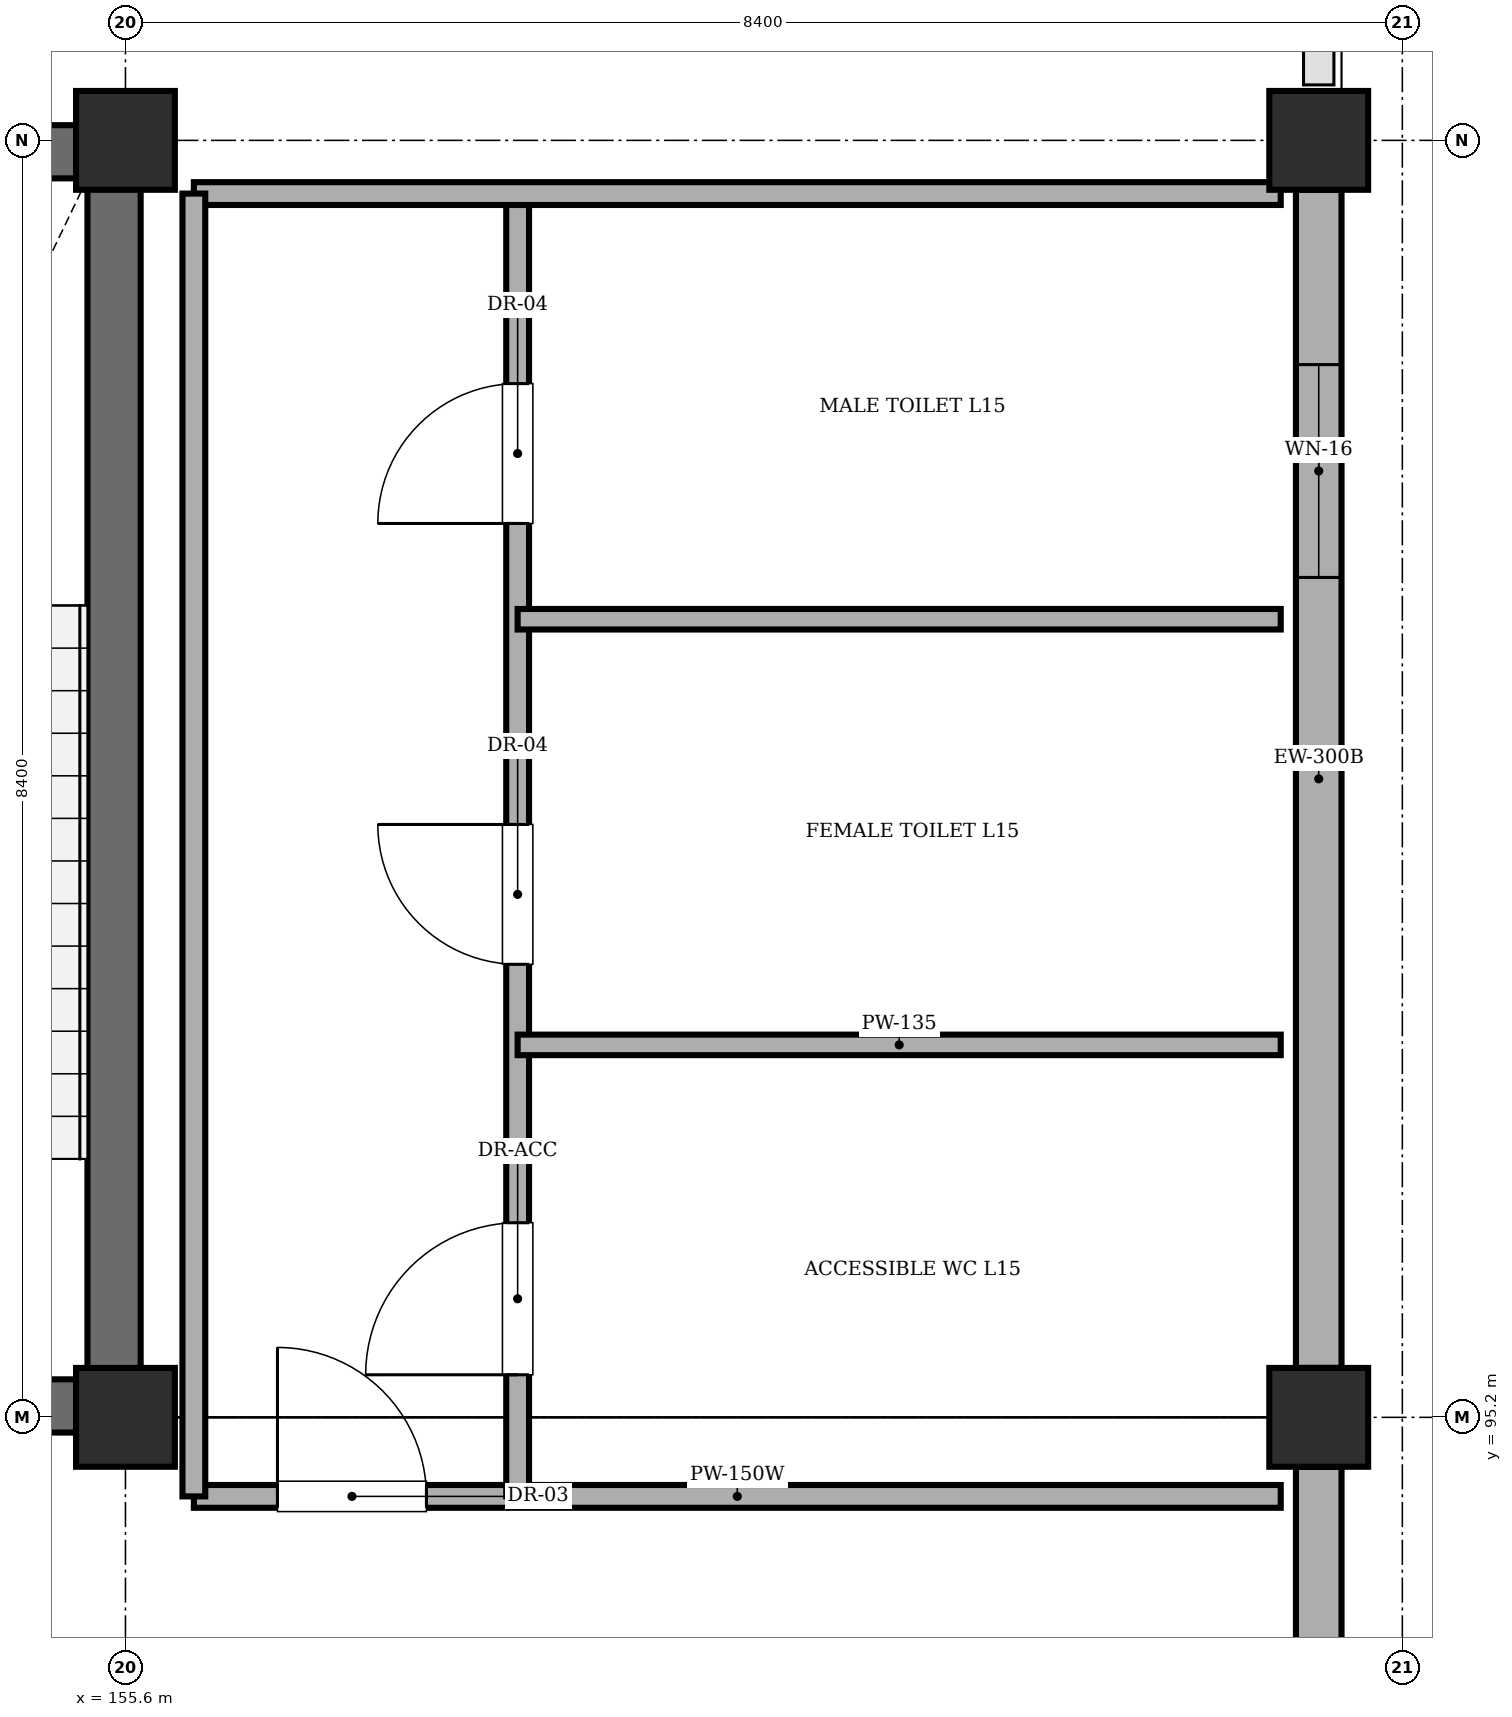
"""IFC4 building model, lengths in metres.
Left out: names, types, materials, properties, quantities, classifications, styles, units other than length and angle.
Written with IfcOpenShell. Run it as: python <this file> out.ifc"""

import sys

from ifc_helpers import new_model, si_unit, direction, frame, frame_2d, origin, origin_2d, place, context, subcontext, project, spatial, rectangle, extrude, element, fill, save


model = new_model("IFC4")
c1 = context("Model", 3, precision=1e-05, world=origin(), true_north=direction((0.0, 1.0)))
c2 = subcontext(c1, "Body", "Model", "MODEL_VIEW")
j1 = project(units=[si_unit("LENGTHUNIT", "METRE"), si_unit("PLANEANGLEUNIT", "RADIAN")], contexts=[c1])
p1 = place(None, origin())
s1 = spatial("IfcSite", under=j1, at=p1, CompositionType="ELEMENT")
p2 = place(p1, origin())
s2 = spatial("IfcBuilding", under=s1, at=p2, CompositionType="ELEMENT")
p3 = place(p2, frame((0.0, 0.0, 61.2)))
s3 = spatial("IfcBuildingStorey", under=s2, at=p3, CompositionType="ELEMENT", Elevation=61.2)
for number, where, z_axis, x_axis in (
    (1, (155.6, 95.2, 0.0), (0.0, 0.0, 1.0), (1.0, 0.0, 0.0)),
    (2, (155.6, 103.6, 0.0), (0.0, 0.0, 1.0), (1.0, 0.0, 0.0)),
    (3, (163.45, 95.2, 0.0), (0.0, 0.0, 1.0), (1.0, 0.0, 0.0)),
    (4, (163.45, 103.6, 0.0), (0.0, 0.0, 1.0), (1.0, 0.0, 0.0)),
):
    element("IfcColumn", number, at=place(p3, frame(where, z_axis=z_axis, x_axis=x_axis)), inside=s3, PredefinedType="COLUMN", context=c2, shape_type="SweptSolid", body=[
        extrude(rectangle(XDim=0.65, YDim=0.65, at=origin_2d()), origin(), (0.0, 0.0, 1.0), 4.28),
    ])
for number, where, z_axis, x_axis in (
    (5, (151.9, 95.275, 0.0), (0.0, 0.0, 1.0), (1.0, 0.0, 0.0)),
    (6, (151.9, 103.525, 0.0), (0.0, 0.0, 1.0), (1.0, 0.0, 0.0)),
):
    element("IfcWall", number, at=place(p3, frame(where, z_axis=z_axis, x_axis=x_axis)), inside=s3, PredefinedType="SHEAR", context=c2, shape_type="SweptSolid", body=[
        extrude(rectangle(XDim=3.8, YDim=0.35, at=frame_2d((1.9, 0.0))), origin(), (0.0, 0.0, 1.0), 4.28),
    ])
p4 = place(p3, frame((155.525, 95.45, 0.0), z_axis=(0.0, 0.0, 1.0), x_axis=(0.0, 1.0, 0.0)))
e7 = element("IfcWall", 7, at=p4, inside=s3, PredefinedType="SHEAR", context=c2, shape_type="SweptSolid", body=[
    extrude(rectangle(XDim=7.9, YDim=0.35, at=frame_2d((3.95, 0.0))), origin(), (0.0, 0.0, 1.0), 4.28),
])
p5 = place(p3, frame((163.45, 94.875, 0.0), z_axis=(0.0, 0.0, 1.0), x_axis=(0.0, -1.0, 0.0)))
e8 = element("IfcWall", 8, at=p5, inside=s3, PredefinedType="STANDARD", context=c2, shape_type="SweptSolid", body=[
    extrude(rectangle(XDim=7.75, YDim=0.3, at=frame_2d((3.875, 0.0))), origin(), (0.0, 0.0, 1.0), 3.58),
])
p6 = place(p5, frame((4.2, 0.0, 1.1)))
e9 = element("IfcOpeningElement", 9, at=p6, cuts=e8, PredefinedType="OPENING", context=c2, shape_type="SweptSolid", body=[
    extrude(rectangle(XDim=1.8, YDim=1.8, at=frame_2d((0.9, 0.9))), frame((0.0, 0.16, 0.0), z_axis=(0.0, -1.0, 0.0), x_axis=(1.0, 0.0, 0.0)), (0.0, 0.0, 1.0), 0.32),
])
p7 = place(p3, frame((163.45, 103.275, 0.0), z_axis=(0.0, 0.0, 1.0), x_axis=(0.0, -1.0, 0.0)))
e10 = element("IfcWall", 10, at=p7, inside=s3, PredefinedType="STANDARD", context=c2, shape_type="SweptSolid", body=[
    extrude(rectangle(XDim=7.75, YDim=0.3, at=frame_2d((3.875, 0.0))), origin(), (0.0, 0.0, 1.0), 3.58),
])
p8 = place(p7, frame((1.15, 0.0, 1.1)))
e11 = element("IfcOpeningElement", 11, at=p8, cuts=e10, PredefinedType="OPENING", context=c2, shape_type="SweptSolid", body=[
    extrude(rectangle(XDim=1.4, YDim=1.4, at=frame_2d((0.7, 0.7))), frame((0.0, 0.16, 0.0), z_axis=(0.0, -1.0, 0.0), x_axis=(1.0, 0.0, 0.0)), (0.0, 0.0, 1.0), 0.32),
])
p9 = place(p3, frame((156.05, 94.68, 0.0), z_axis=(0.0, 0.0, 1.0), x_axis=(1.0, 0.0, 0.0)))
e12 = element("IfcWall", 12, at=p9, inside=s3, PredefinedType="PARTITIONING", context=c2, shape_type="SweptSolid", body=[
    extrude(rectangle(XDim=7.15, YDim=0.15, at=frame_2d((3.575, 0.0))), origin(), (0.0, 0.0, 1.0), 4.28),
])
p10 = place(p9, frame((0.55, 0.0, 0.0)))
e13 = element("IfcOpeningElement", 13, at=p10, cuts=e12, PredefinedType="OPENING", context=c2, shape_type="SweptSolid", body=[
    extrude(rectangle(XDim=0.98, YDim=2.12, at=frame_2d((0.49, 1.06))), frame((0.0, 0.085, 0.0), z_axis=(0.0, -1.0, 0.0), x_axis=(1.0, 0.0, 0.0)), (0.0, 0.0, 1.0), 0.17),
])
p11 = place(p3, frame((158.18, 94.68, 0.0), z_axis=(0.0, 0.0, 1.0), x_axis=(0.0, 1.0, 0.0)))
e14 = element("IfcWall", 14, at=p11, inside=s3, PredefinedType="PARTITIONING", context=c2, shape_type="SweptSolid", body=[
    extrude(rectangle(XDim=8.57, YDim=0.15, at=frame_2d((4.285, 0.0))), origin(), (0.0, 0.0, 1.0), 4.28),
])
p12 = place(p11, frame((0.8, 0.0, 0.0)))
e15 = element("IfcOpeningElement", 15, at=p12, cuts=e14, PredefinedType="OPENING", context=c2, shape_type="SweptSolid", body=[
    extrude(rectangle(XDim=1.0, YDim=2.12, at=frame_2d((0.5, 1.06))), frame((0.0, 0.085, 0.0), z_axis=(0.0, -1.0, 0.0), x_axis=(1.0, 0.0, 0.0)), (0.0, 0.0, 1.0), 0.17),
])
p13 = place(p11, frame((3.5, 0.0, 0.0)))
e16 = element("IfcOpeningElement", 16, at=p13, cuts=e14, PredefinedType="OPENING", context=c2, shape_type="SweptSolid", body=[
    extrude(rectangle(XDim=0.92, YDim=2.1, at=frame_2d((0.46, 1.05))), frame((0.0, 0.085, 0.0), z_axis=(0.0, -1.0, 0.0), x_axis=(1.0, 0.0, 0.0)), (0.0, 0.0, 1.0), 0.17),
])
p14 = place(p11, frame((6.4, 0.0, 0.0)))
e17 = element("IfcOpeningElement", 17, at=p14, cuts=e14, PredefinedType="OPENING", context=c2, shape_type="SweptSolid", body=[
    extrude(rectangle(XDim=0.92, YDim=2.1, at=frame_2d((0.46, 1.05))), frame((0.0, 0.085, 0.0), z_axis=(0.0, -1.0, 0.0), x_axis=(1.0, 0.0, 0.0)), (0.0, 0.0, 1.0), 0.17),
])
for number, where, z_axis, x_axis in (
    (18, (158.18, 97.65, 0.0), (0.0, 0.0, 1.0), (1.0, 0.0, 0.0)),
    (19, (158.18, 100.45, 0.0), (0.0, 0.0, 1.0), (1.0, 0.0, 0.0)),
):
    element("IfcWall", number, at=place(p3, frame(where, z_axis=z_axis, x_axis=x_axis)), inside=s3, PredefinedType="PARTITIONING", context=c2, shape_type="SweptSolid", body=[
        extrude(rectangle(XDim=5.02, YDim=0.135, at=frame_2d((2.51, 0.0))), origin(), (0.0, 0.0, 1.0), 4.28),
    ])
p15 = place(p3, frame((156.05, 103.25, 0.0), z_axis=(0.0, 0.0, 1.0), x_axis=(1.0, 0.0, 0.0)))
e20 = element("IfcWall", 20, at=p15, inside=s3, PredefinedType="PARTITIONING", context=c2, shape_type="SweptSolid", body=[
    extrude(rectangle(XDim=7.15, YDim=0.15, at=frame_2d((3.575, 0.0))), origin(), (0.0, 0.0, 1.0), 4.28),
])
p16 = place(p3, frame((156.05, 94.68, 0.0), z_axis=(0.0, 0.0, 1.0), x_axis=(0.0, 1.0, 0.0)))
e21 = element("IfcWall", 21, at=p16, inside=s3, PredefinedType="PARTITIONING", context=c2, shape_type="SweptSolid", body=[
    extrude(rectangle(XDim=8.57, YDim=0.15, at=frame_2d((4.285, 0.0))), origin(), (0.0, 0.0, 1.0), 4.28),
])
p17 = place(p8, origin())
e22 = element("IfcWindow", 22, at=p17, inside=s3, PartitioningType="SINGLE_PANEL", PredefinedType="WINDOW", context=c2, shape_type="SweptSolid", body=[
    extrude(rectangle(XDim=1.4, YDim=1.4, at=frame_2d((0.7, 0.7))), frame((0.0, 0.03, 0.0), z_axis=(0.0, -1.0, 0.0), x_axis=(1.0, 0.0, 0.0)), (0.0, 0.0, 1.0), 0.06),
])
fill(e11, e22)
p18 = place(p10, origin())
e23 = element("IfcDoor", 23, at=p18, inside=s3, OperationType="SINGLE_SWING_LEFT", PredefinedType="DOOR", context=c2, shape_type="SweptSolid", body=[
    extrude(rectangle(XDim=0.98, YDim=2.12, at=frame_2d((0.49, 1.06))), frame((0.0, 0.025, 0.0), z_axis=(0.0, -1.0, 0.0), x_axis=(1.0, 0.0, 0.0)), (0.0, 0.0, 1.0), 0.05),
])
fill(e13, e23)
p19 = place(p12, origin())
e24 = element("IfcDoor", 24, at=p19, inside=s3, OperationType="SINGLE_SWING_LEFT", PredefinedType="DOOR", context=c2, shape_type="SweptSolid", body=[
    extrude(rectangle(XDim=1.0, YDim=2.12, at=frame_2d((0.5, 1.06))), frame((0.0, 0.025, 0.0), z_axis=(0.0, -1.0, 0.0), x_axis=(1.0, 0.0, 0.0)), (0.0, 0.0, 1.0), 0.05),
])
fill(e15, e24)
p20 = place(p13, origin())
e25 = element("IfcDoor", 25, at=p20, inside=s3, OperationType="SINGLE_SWING_RIGHT", PredefinedType="DOOR", context=c2, shape_type="SweptSolid", body=[
    extrude(rectangle(XDim=0.92, YDim=2.1, at=frame_2d((0.46, 1.05))), frame((0.0, 0.025, 0.0), z_axis=(0.0, -1.0, 0.0), x_axis=(1.0, 0.0, 0.0)), (0.0, 0.0, 1.0), 0.05),
])
fill(e16, e25)
p21 = place(p14, origin())
e26 = element("IfcDoor", 26, at=p21, inside=s3, OperationType="SINGLE_SWING_LEFT", PredefinedType="DOOR", context=c2, shape_type="SweptSolid", body=[
    extrude(rectangle(XDim=0.92, YDim=2.1, at=frame_2d((0.46, 1.05))), frame((0.0, 0.025, 0.0), z_axis=(0.0, -1.0, 0.0), x_axis=(1.0, 0.0, 0.0)), (0.0, 0.0, 1.0), 0.05),
])
fill(e17, e26)
save(model, sys.argv[1])
